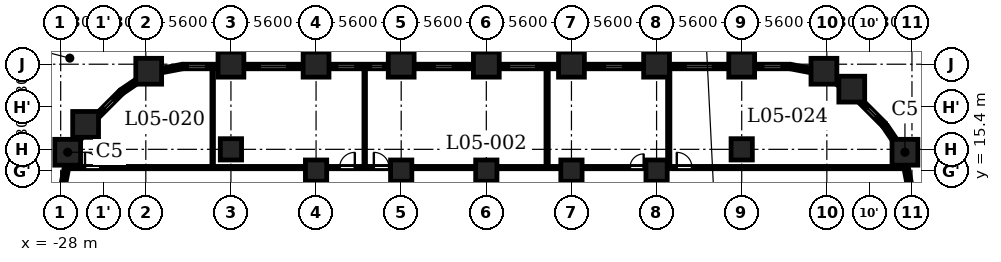
"""IFC4 building model, lengths in metres.
Left out: names, types, materials, properties, quantities, classifications, styles, units other than length and angle.
Written with IfcOpenShell. Run it as: python <this file> out.ifc"""

import sys

from ifc_helpers import new_model, si_unit, direction, frame, frame_2d, origin, origin_2d, place, context, subcontext, project, spatial, rectangle, extrude, element, fill, save


model = new_model("IFC4")
c1 = context("Model", 3, precision=1e-05, world=origin(), true_north=direction((0.0, 1.0)))
c2 = subcontext(c1, "Body", "Model", "MODEL_VIEW")
j1 = project(units=[si_unit("LENGTHUNIT", "METRE"), si_unit("PLANEANGLEUNIT", "RADIAN")], contexts=[c1])
p1 = place(None, origin())
s1 = spatial("IfcSite", under=j1, at=p1, CompositionType="ELEMENT")
p2 = place(p1, origin())
s2 = spatial("IfcBuilding", under=s1, at=p2, CompositionType="ELEMENT")
p3 = place(p2, frame((0.0, 0.0, 25.7)))
s3 = spatial("IfcBuildingStorey", under=s2, at=p3, CompositionType="ELEMENT", Elevation=25.7)
for number, where, z_axis, x_axis in (
    (1, (27.538, 16.609, 0.0), (0.0, 0.0, 1.0), (1.0, 0.0, 0.0)),
    (2, (24.04, 20.76, 0.0), (0.0, 0.0, 1.0), (1.0, 0.0, 0.0)),
    (3, (22.209, 21.938, 0.0), (0.0, 0.0, 1.0), (1.0, 0.0, 0.0)),
    (4, (16.8, 22.4, 0.0), (0.0, 0.0, 1.0), (1.0, 0.0, 0.0)),
    (5, (11.2, 22.4, 0.0), (0.0, 0.0, 1.0), (1.0, 0.0, 0.0)),
    (6, (5.6, 22.4, 0.0), (0.0, 0.0, 1.0), (1.0, 0.0, 0.0)),
    (7, (0.0, 22.4, 0.0), (0.0, 0.0, 1.0), (1.0, 0.0, 0.0)),
    (8, (-5.6, 22.4, 0.0), (0.0, 0.0, 1.0), (1.0, 0.0, 0.0)),
    (9, (-11.2, 22.4, 0.0), (0.0, 0.0, 1.0), (1.0, 0.0, 0.0)),
    (10, (-16.8, 22.4, 0.0), (0.0, 0.0, 1.0), (1.0, 0.0, 0.0)),
    (11, (-22.209, 21.938, 0.0), (0.0, 0.0, 1.0), (1.0, 0.0, 0.0)),
    (12, (-26.36, 18.44, 0.0), (0.0, 0.0, 1.0), (1.0, 0.0, 0.0)),
    (13, (-27.538, 16.609, 0.0), (0.0, 0.0, 1.0), (1.0, 0.0, 0.0)),
):
    element("IfcColumn", number, at=place(p3, frame(where, z_axis=z_axis, x_axis=x_axis)), inside=s3, PredefinedType="COLUMN", context=c2, shape_type="SweptSolid", body=[
        extrude(rectangle(XDim=1.7, YDim=1.7, at=origin_2d()), origin(), (0.0, 0.0, 1.0), 4.8),
    ])
for number, where, z_axis, x_axis in (
    (14, (-16.8, 16.8, 0.0), (0.0, 0.0, 1.0), (1.0, 0.0, 0.0)),
    (15, (16.8, 16.8, 0.0), (0.0, 0.0, 1.0), (1.0, 0.0, 0.0)),
    (16, (-11.2, 15.4, 0.0), (0.0, 0.0, 1.0), (1.0, 0.0, 0.0)),
    (17, (-5.6, 15.4, 0.0), (0.0, 0.0, 1.0), (1.0, 0.0, 0.0)),
    (18, (0.0, 15.4, 0.0), (0.0, 0.0, 1.0), (1.0, 0.0, 0.0)),
    (19, (5.6, 15.4, 0.0), (0.0, 0.0, 1.0), (1.0, 0.0, 0.0)),
    (20, (11.2, 15.4, 0.0), (0.0, 0.0, 1.0), (1.0, 0.0, 0.0)),
):
    element("IfcColumn", number, at=place(p3, frame(where, z_axis=z_axis, x_axis=x_axis)), inside=s3, PredefinedType="COLUMN", context=c2, shape_type="SweptSolid", body=[
        extrude(rectangle(XDim=1.4, YDim=1.4, at=origin_2d()), origin(), (0.0, 0.0, 1.0), 4.8),
    ])
for number, where, z_axis, x_axis in (
    (21, (27.853, 14.372, 0.0), (0.0, 0.0, 1.0), (-0.187, 0.982, 0.0)),
    (22, (26.969, 17.25, 0.0), (0.0, 0.0, 1.0), (-0.562, 0.827, 0.0)),
):
    element("IfcWall", number, at=place(p3, frame(where, z_axis=z_axis, x_axis=x_axis)), inside=s3, PredefinedType="SOLIDWALL", context=c2, shape_type="SweptSolid", body=[
        extrude(rectangle(XDim=1.406, YDim=0.3, at=frame_2d((0.703, 0.0))), origin(), (0.0, 0.0, 1.0), 3.55),
    ])
p4 = place(p3, frame((26.197, 18.391, 0.0), z_axis=(0.0, 0.0, 1.0), x_axis=(-0.707054835785, 0.707158722772, 0.0)))
e23 = element("IfcWall", 23, at=p4, inside=s3, PredefinedType="SOLIDWALL", context=c2, shape_type="SweptSolid", body=[
    extrude(rectangle(XDim=2.35, YDim=0.3, at=frame_2d((1.175, 0.0))), origin(), (0.0, 0.0, 1.0), 3.55),
])
p5 = place(p4, frame((0.775, 0.0, 0.6)))
e24 = element("IfcOpeningElement", 24, at=p5, cuts=e23, PredefinedType="OPENING", context=c2, shape_type="SweptSolid", body=[
    extrude(rectangle(XDim=0.8, YDim=1.55, at=frame_2d((0.4, 0.775))), frame((0.0, 0.16, 0.0), z_axis=(0.0, -1.0, 0.0), x_axis=(1.0, 0.0, 0.0)), (0.0, 0.0, 1.0), 0.32),
])
p6 = place(p3, frame((23.244, 21.101, 0.0), z_axis=(0.0, 0.0, 1.0), x_axis=(-0.827135885329, 0.562001981492, 0.0)))
e25 = element("IfcWall", 25, at=p6, inside=s3, PredefinedType="SOLIDWALL", context=c2, shape_type="SweptSolid", body=[
    extrude(rectangle(XDim=0.477, YDim=0.3, at=frame_2d((0.239, 0.0))), origin(), (0.0, 0.0, 1.0), 4.45),
])
p7 = place(p3, frame((21.353, 21.989, 0.0), z_axis=(0.0, 0.0, 1.0), x_axis=(-0.98229142023, 0.187359455971, 0.0)))
e26 = element("IfcWall", 26, at=p7, inside=s3, PredefinedType="SOLIDWALL", context=c2, shape_type="SweptSolid", body=[
    extrude(rectangle(XDim=1.406, YDim=0.3, at=frame_2d((0.703, 0.0))), origin(), (0.0, 0.0, 1.0), 3.55),
])
p8 = place(p3, frame((20.0, 22.25, 0.0), z_axis=(0.0, 0.0, 1.0), x_axis=(-1.0, 0.0, 0.0)))
e27 = element("IfcWall", 27, at=p8, inside=s3, PredefinedType="SOLIDWALL", context=c2, shape_type="SweptSolid", body=[
    extrude(rectangle(XDim=2.35, YDim=0.3, at=frame_2d((1.175, 0.0))), origin(), (0.0, 0.0, 1.0), 3.55),
])
p9 = place(p8, frame((0.575, 0.0, 0.6)))
e28 = element("IfcOpeningElement", 28, at=p9, cuts=e27, PredefinedType="OPENING", context=c2, shape_type="SweptSolid", body=[
    extrude(rectangle(XDim=1.2, YDim=1.55, at=frame_2d((0.6, 0.775))), frame((0.0, 0.16, 0.0), z_axis=(0.0, -1.0, 0.0), x_axis=(1.0, 0.0, 0.0)), (0.0, 0.0, 1.0), 0.32),
])
p10 = place(p3, frame((15.95, 22.25, 0.0), z_axis=(0.0, 0.0, 1.0), x_axis=(-1.0, 0.0, 0.0)))
e29 = element("IfcWall", 29, at=p10, inside=s3, PredefinedType="SOLIDWALL", context=c2, shape_type="SweptSolid", body=[
    extrude(rectangle(XDim=3.9, YDim=0.3, at=frame_2d((1.95, 0.0))), origin(), (0.0, 0.0, 1.0), 3.55),
])
p11 = place(p10, frame((1.038, 0.0, 0.9)))
e30 = element("IfcOpeningElement", 30, at=p11, cuts=e29, PredefinedType="OPENING", context=c2, shape_type="SweptSolid", body=[
    extrude(rectangle(XDim=1.8, YDim=1.25, at=frame_2d((0.9, 0.625))), frame((0.0, 0.16, 0.0), z_axis=(0.0, -1.0, 0.0), x_axis=(1.0, 0.0, 0.0)), (0.0, 0.0, 1.0), 0.32),
])
p12 = place(p3, frame((10.35, 22.25, 0.0), z_axis=(0.0, 0.0, 1.0), x_axis=(-1.0, 0.0, 0.0)))
e31 = element("IfcWall", 31, at=p12, inside=s3, PredefinedType="SOLIDWALL", context=c2, shape_type="SweptSolid", body=[
    extrude(rectangle(XDim=3.9, YDim=0.3, at=frame_2d((1.95, 0.0))), origin(), (0.0, 0.0, 1.0), 3.55),
])
p13 = place(p12, frame((1.35, 0.0, 0.6)))
e32 = element("IfcOpeningElement", 32, at=p13, cuts=e31, PredefinedType="OPENING", context=c2, shape_type="SweptSolid", body=[
    extrude(rectangle(XDim=1.2, YDim=1.55, at=frame_2d((0.6, 0.775))), frame((0.0, 0.16, 0.0), z_axis=(0.0, -1.0, 0.0), x_axis=(1.0, 0.0, 0.0)), (0.0, 0.0, 1.0), 0.32),
])
p14 = place(p3, frame((4.75, 22.25, 0.0), z_axis=(0.0, 0.0, 1.0), x_axis=(-1.0, 0.0, 0.0)))
e33 = element("IfcWall", 33, at=p14, inside=s3, PredefinedType="SOLIDWALL", context=c2, shape_type="SweptSolid", body=[
    extrude(rectangle(XDim=3.9, YDim=0.3, at=frame_2d((1.95, 0.0))), origin(), (0.0, 0.0, 1.0), 3.55),
])
p15 = place(p14, frame((1.462, 0.0, 0.9)))
e34 = element("IfcOpeningElement", 34, at=p15, cuts=e33, PredefinedType="OPENING", context=c2, shape_type="SweptSolid", body=[
    extrude(rectangle(XDim=1.8, YDim=1.25, at=frame_2d((0.9, 0.625))), frame((0.0, 0.16, 0.0), z_axis=(0.0, -1.0, 0.0), x_axis=(1.0, 0.0, 0.0)), (0.0, 0.0, 1.0), 0.32),
])
p16 = place(p3, frame((-0.85, 22.25, 0.0), z_axis=(0.0, 0.0, 1.0), x_axis=(-1.0, 0.0, 0.0)))
e35 = element("IfcWall", 35, at=p16, inside=s3, PredefinedType="SOLIDWALL", context=c2, shape_type="SweptSolid", body=[
    extrude(rectangle(XDim=3.9, YDim=0.3, at=frame_2d((1.95, 0.0))), origin(), (0.0, 0.0, 1.0), 3.55),
])
p17 = place(p16, frame((1.35, 0.0, 0.6)))
e36 = element("IfcOpeningElement", 36, at=p17, cuts=e35, PredefinedType="OPENING", context=c2, shape_type="SweptSolid", body=[
    extrude(rectangle(XDim=1.2, YDim=1.55, at=frame_2d((0.6, 0.775))), frame((0.0, 0.16, 0.0), z_axis=(0.0, -1.0, 0.0), x_axis=(1.0, 0.0, 0.0)), (0.0, 0.0, 1.0), 0.32),
])
p18 = place(p3, frame((-6.45, 22.25, 0.0), z_axis=(0.0, 0.0, 1.0), x_axis=(-1.0, 0.0, 0.0)))
e37 = element("IfcWall", 37, at=p18, inside=s3, PredefinedType="SOLIDWALL", context=c2, shape_type="SweptSolid", body=[
    extrude(rectangle(XDim=3.9, YDim=0.3, at=frame_2d((1.95, 0.0))), origin(), (0.0, 0.0, 1.0), 3.55),
])
p19 = place(p18, frame((0.337, 0.0, 0.6)))
e38 = element("IfcOpeningElement", 38, at=p19, cuts=e37, PredefinedType="OPENING", context=c2, shape_type="SweptSolid", body=[
    extrude(rectangle(XDim=0.8, YDim=1.55, at=frame_2d((0.4, 0.775))), frame((0.0, 0.16, 0.0), z_axis=(0.0, -1.0, 0.0), x_axis=(1.0, 0.0, 0.0)), (0.0, 0.0, 1.0), 0.32),
])
p20 = place(p18, frame((2.163, 0.0, 0.6)))
e39 = element("IfcOpeningElement", 39, at=p20, cuts=e37, PredefinedType="OPENING", context=c2, shape_type="SweptSolid", body=[
    extrude(rectangle(XDim=1.2, YDim=1.55, at=frame_2d((0.6, 0.775))), frame((0.0, 0.16, 0.0), z_axis=(0.0, -1.0, 0.0), x_axis=(1.0, 0.0, 0.0)), (0.0, 0.0, 1.0), 0.32),
])
p21 = place(p3, frame((-12.05, 22.25, 0.0), z_axis=(0.0, 0.0, 1.0), x_axis=(-1.0, 0.0, 0.0)))
e40 = element("IfcWall", 40, at=p21, inside=s3, PredefinedType="SOLIDWALL", context=c2, shape_type="SweptSolid", body=[
    extrude(rectangle(XDim=3.9, YDim=0.3, at=frame_2d((1.95, 0.0))), origin(), (0.0, 0.0, 1.0), 3.55),
])
p22 = place(p21, frame((1.05, 0.0, 0.9)))
e41 = element("IfcOpeningElement", 41, at=p22, cuts=e40, PredefinedType="OPENING", context=c2, shape_type="SweptSolid", body=[
    extrude(rectangle(XDim=1.8, YDim=1.25, at=frame_2d((0.9, 0.625))), frame((0.0, 0.16, 0.0), z_axis=(0.0, -1.0, 0.0), x_axis=(1.0, 0.0, 0.0)), (0.0, 0.0, 1.0), 0.32),
])
p23 = place(p3, frame((-17.65, 22.25, 0.0), z_axis=(0.0, 0.0, 1.0), x_axis=(-1.0, 0.0, 0.0)))
e42 = element("IfcWall", 42, at=p23, inside=s3, PredefinedType="SOLIDWALL", context=c2, shape_type="SweptSolid", body=[
    extrude(rectangle(XDim=2.35, YDim=0.3, at=frame_2d((1.175, 0.0))), origin(), (0.0, 0.0, 1.0), 3.55),
])
p24 = place(p23, frame((0.788, 0.0, 0.6)))
e43 = element("IfcOpeningElement", 43, at=p24, cuts=e42, PredefinedType="OPENING", context=c2, shape_type="SweptSolid", body=[
    extrude(rectangle(XDim=1.2, YDim=1.55, at=frame_2d((0.6, 0.775))), frame((0.0, 0.16, 0.0), z_axis=(0.0, -1.0, 0.0), x_axis=(1.0, 0.0, 0.0)), (0.0, 0.0, 1.0), 0.32),
])
for number, where, z_axis, x_axis in (
    (44, (-19.972, 22.253, 0.0), (0.0, 0.0, 1.0), (-0.982, -0.187, 0.0)),
    (45, (-22.85, 21.369, 0.0), (0.0, 0.0, 1.0), (-0.827, -0.562, 0.0)),
):
    element("IfcWall", number, at=place(p3, frame(where, z_axis=z_axis, x_axis=x_axis)), inside=s3, PredefinedType="SOLIDWALL", context=c2, shape_type="SweptSolid", body=[
        extrude(rectangle(XDim=1.406, YDim=0.3, at=frame_2d((0.703, 0.0))), origin(), (0.0, 0.0, 1.0), 3.55),
    ])
p25 = place(p3, frame((-23.991, 20.597, 0.0), z_axis=(0.0, 0.0, 1.0), x_axis=(-0.707054835785, -0.707158722772, 0.0)))
e46 = element("IfcWall", 46, at=p25, inside=s3, PredefinedType="SOLIDWALL", context=c2, shape_type="SweptSolid", body=[
    extrude(rectangle(XDim=2.35, YDim=0.3, at=frame_2d((1.175, 0.0))), origin(), (0.0, 0.0, 1.0), 3.55),
])
p26 = place(p25, frame((0.775, 0.0, 0.6)))
e47 = element("IfcOpeningElement", 47, at=p26, cuts=e46, PredefinedType="OPENING", context=c2, shape_type="SweptSolid", body=[
    extrude(rectangle(XDim=0.8, YDim=1.55, at=frame_2d((0.4, 0.775))), frame((0.0, 0.16, 0.0), z_axis=(0.0, -1.0, 0.0), x_axis=(1.0, 0.0, 0.0)), (0.0, 0.0, 1.0), 0.32),
])
p27 = place(p3, frame((-26.701, 17.644, 0.0), z_axis=(0.0, 0.0, 1.0), x_axis=(-0.562001981492, -0.827135885329, 0.0)))
e48 = element("IfcWall", 48, at=p27, inside=s3, PredefinedType="SOLIDWALL", context=c2, shape_type="SweptSolid", body=[
    extrude(rectangle(XDim=0.477, YDim=0.3, at=frame_2d((0.239, 0.0))), origin(), (0.0, 0.0, 1.0), 4.45),
])
p28 = place(p3, frame((-27.589, 15.753, 0.0), z_axis=(0.0, 0.0, 1.0), x_axis=(-0.187327504018, -0.982297514116, 0.0)))
e49 = element("IfcWall", 49, at=p28, inside=s3, PredefinedType="SOLIDWALL", context=c2, shape_type="SweptSolid", body=[
    extrude(rectangle(XDim=1.406, YDim=0.3, at=frame_2d((0.703, 0.0))), origin(), (0.0, 0.0, 1.0), 3.55),
])
p29 = place(p3, frame((-27.446, 15.6, 0.0), z_axis=(0.0, 0.0, 1.0), x_axis=(1.0, 0.0, 0.0)))
e50 = element("IfcWall", 50, at=p29, inside=s3, PredefinedType="PARTITIONING", context=c2, shape_type="SweptSolid", body=[
    extrude(rectangle(XDim=54.892, YDim=0.15, at=frame_2d((27.446, 0.0))), origin(), (0.0, 0.0, 1.0), 4.45),
])
p30 = place(p29, frame((1.046, 0.0, 0.0)))
e51 = element("IfcOpeningElement", 51, at=p30, cuts=e50, PredefinedType="OPENING", context=c2, shape_type="SweptSolid", body=[
    extrude(rectangle(XDim=1.0, YDim=2.1, at=frame_2d((0.5, 1.05))), frame((0.0, 0.085, 0.0), z_axis=(0.0, -1.0, 0.0), x_axis=(1.0, 0.0, 0.0)), (0.0, 0.0, 1.0), 0.17),
])
p31 = place(p29, frame((17.796, 0.0, 0.0)))
e52 = element("IfcOpeningElement", 52, at=p31, cuts=e50, PredefinedType="OPENING", context=c2, shape_type="SweptSolid", body=[
    extrude(rectangle(XDim=1.0, YDim=2.1, at=frame_2d((0.5, 1.05))), frame((0.0, 0.085, 0.0), z_axis=(0.0, -1.0, 0.0), x_axis=(1.0, 0.0, 0.0)), (0.0, 0.0, 1.0), 0.17),
])
p32 = place(p29, frame((20.046, 0.0, 0.0)))
e53 = element("IfcOpeningElement", 53, at=p32, cuts=e50, PredefinedType="OPENING", context=c2, shape_type="SweptSolid", body=[
    extrude(rectangle(XDim=1.0, YDim=2.1, at=frame_2d((0.5, 1.05))), frame((0.0, 0.085, 0.0), z_axis=(0.0, -1.0, 0.0), x_axis=(1.0, 0.0, 0.0)), (0.0, 0.0, 1.0), 0.17),
])
p33 = place(p29, frame((36.896, 0.0, 0.0)))
e54 = element("IfcOpeningElement", 54, at=p33, cuts=e50, PredefinedType="OPENING", context=c2, shape_type="SweptSolid", body=[
    extrude(rectangle(XDim=0.9, YDim=2.1, at=frame_2d((0.45, 1.05))), frame((0.0, 0.085, 0.0), z_axis=(0.0, -1.0, 0.0), x_axis=(1.0, 0.0, 0.0)), (0.0, 0.0, 1.0), 0.17),
])
p34 = place(p29, frame((39.975, 0.0, 0.0)))
e55 = element("IfcOpeningElement", 55, at=p34, cuts=e50, PredefinedType="OPENING", context=c2, shape_type="SweptSolid", body=[
    extrude(rectangle(XDim=1.0, YDim=2.1, at=frame_2d((0.5, 1.05))), frame((0.0, 0.085, 0.0), z_axis=(0.0, -1.0, 0.0), x_axis=(1.0, 0.0, 0.0)), (0.0, 0.0, 1.0), 0.17),
])
for number, where, z_axis, x_axis in (
    (56, (-18.0, 15.675, 0.0), (0.0, 0.0, 1.0), (0.0, 1.0, 0.0)),
    (57, (-8.0, 15.675, 0.0), (0.0, 0.0, 1.0), (0.0, 1.0, 0.0)),
):
    element("IfcWall", number, at=place(p3, frame(where, z_axis=z_axis, x_axis=x_axis)), inside=s3, PredefinedType="PARTITIONING", context=c2, shape_type="SweptSolid", body=[
        extrude(rectangle(XDim=6.405, YDim=0.1, at=frame_2d((3.203, 0.0))), origin(), (0.0, 0.0, 1.0), 4.45),
    ])
p35 = place(p3, frame((4.0, 15.675, 0.0), z_axis=(0.0, 0.0, 1.0), x_axis=(0.0, 1.0, 0.0)))
e58 = element("IfcWall", 58, at=p35, inside=s3, PredefinedType="PARTITIONING", context=c2, shape_type="SweptSolid", body=[
    extrude(rectangle(XDim=6.405, YDim=0.15, at=frame_2d((3.203, 0.0))), origin(), (0.0, 0.0, 1.0), 4.45),
])
p36 = place(p3, frame((12.0, 15.675, 0.0), z_axis=(0.0, 0.0, 1.0), x_axis=(0.0, 1.0, 0.0)))
e59 = element("IfcWall", 59, at=p36, inside=s3, PredefinedType="PARTITIONING", context=c2, shape_type="SweptSolid", body=[
    extrude(rectangle(XDim=6.635, YDim=0.15, at=frame_2d((3.317, 0.0))), origin(), (0.0, 0.0, 1.0), 4.45),
])
p37 = place(p30, origin())
e60 = element("IfcDoor", 60, at=p37, inside=s3, OperationType="SINGLE_SWING_RIGHT", PredefinedType="DOOR", context=c2, shape_type="SweptSolid", body=[
    extrude(rectangle(XDim=1.0, YDim=2.1, at=frame_2d((0.5, 1.05))), frame((0.0, 0.025, 0.0), z_axis=(0.0, -1.0, 0.0), x_axis=(1.0, 0.0, 0.0)), (0.0, 0.0, 1.0), 0.05),
])
fill(e51, e60)
p38 = place(p31, origin())
e61 = element("IfcDoor", 61, at=p38, inside=s3, OperationType="SINGLE_SWING_LEFT", PredefinedType="DOOR", context=c2, shape_type="SweptSolid", body=[
    extrude(rectangle(XDim=1.0, YDim=2.1, at=frame_2d((0.5, 1.05))), frame((0.0, 0.025, 0.0), z_axis=(0.0, -1.0, 0.0), x_axis=(1.0, 0.0, 0.0)), (0.0, 0.0, 1.0), 0.05),
])
fill(e52, e61)
p39 = place(p32, origin())
e62 = element("IfcDoor", 62, at=p39, inside=s3, OperationType="SINGLE_SWING_RIGHT", PredefinedType="DOOR", context=c2, shape_type="SweptSolid", body=[
    extrude(rectangle(XDim=1.0, YDim=2.1, at=frame_2d((0.5, 1.05))), frame((0.0, 0.025, 0.0), z_axis=(0.0, -1.0, 0.0), x_axis=(1.0, 0.0, 0.0)), (0.0, 0.0, 1.0), 0.05),
])
fill(e53, e62)
p40 = place(p33, origin())
e63 = element("IfcDoor", 63, at=p40, inside=s3, OperationType="SINGLE_SWING_LEFT", PredefinedType="DOOR", context=c2, shape_type="SweptSolid", body=[
    extrude(rectangle(XDim=0.9, YDim=2.1, at=frame_2d((0.45, 1.05))), frame((0.0, 0.025, 0.0), z_axis=(0.0, -1.0, 0.0), x_axis=(1.0, 0.0, 0.0)), (0.0, 0.0, 1.0), 0.05),
])
fill(e54, e63)
p41 = place(p34, origin())
e64 = element("IfcDoor", 64, at=p41, inside=s3, OperationType="SINGLE_SWING_RIGHT", PredefinedType="DOOR", context=c2, shape_type="SweptSolid", body=[
    extrude(rectangle(XDim=1.0, YDim=2.1, at=frame_2d((0.5, 1.05))), frame((0.0, 0.025, 0.0), z_axis=(0.0, -1.0, 0.0), x_axis=(1.0, 0.0, 0.0)), (0.0, 0.0, 1.0), 0.05),
])
fill(e55, e64)
p42 = place(p5, origin())
e65 = element("IfcWindow", 65, at=p42, inside=s3, PartitioningType="SINGLE_PANEL", PredefinedType="WINDOW", context=c2, shape_type="SweptSolid", body=[
    extrude(rectangle(XDim=0.8, YDim=1.55, at=frame_2d((0.4, 0.775))), frame((0.0, 0.03, 0.0), z_axis=(0.0, -1.0, 0.0), x_axis=(1.0, 0.0, 0.0)), (0.0, 0.0, 1.0), 0.06),
])
fill(e24, e65)
p43 = place(p9, origin())
e66 = element("IfcWindow", 66, at=p43, inside=s3, PartitioningType="SINGLE_PANEL", PredefinedType="WINDOW", context=c2, shape_type="SweptSolid", body=[
    extrude(rectangle(XDim=1.2, YDim=1.55, at=frame_2d((0.6, 0.775))), frame((0.0, 0.03, 0.0), z_axis=(0.0, -1.0, 0.0), x_axis=(1.0, 0.0, 0.0)), (0.0, 0.0, 1.0), 0.06),
])
fill(e28, e66)
p44 = place(p11, origin())
e67 = element("IfcWindow", 67, at=p44, inside=s3, PartitioningType="SINGLE_PANEL", PredefinedType="WINDOW", context=c2, shape_type="SweptSolid", body=[
    extrude(rectangle(XDim=1.8, YDim=1.25, at=frame_2d((0.9, 0.625))), frame((0.0, 0.03, 0.0), z_axis=(0.0, -1.0, 0.0), x_axis=(1.0, 0.0, 0.0)), (0.0, 0.0, 1.0), 0.06),
])
fill(e30, e67)
p45 = place(p13, origin())
e68 = element("IfcWindow", 68, at=p45, inside=s3, PartitioningType="SINGLE_PANEL", PredefinedType="WINDOW", context=c2, shape_type="SweptSolid", body=[
    extrude(rectangle(XDim=1.2, YDim=1.55, at=frame_2d((0.6, 0.775))), frame((0.0, 0.03, 0.0), z_axis=(0.0, -1.0, 0.0), x_axis=(1.0, 0.0, 0.0)), (0.0, 0.0, 1.0), 0.06),
])
fill(e32, e68)
p46 = place(p15, origin())
e69 = element("IfcWindow", 69, at=p46, inside=s3, PartitioningType="SINGLE_PANEL", PredefinedType="WINDOW", context=c2, shape_type="SweptSolid", body=[
    extrude(rectangle(XDim=1.8, YDim=1.25, at=frame_2d((0.9, 0.625))), frame((0.0, 0.03, 0.0), z_axis=(0.0, -1.0, 0.0), x_axis=(1.0, 0.0, 0.0)), (0.0, 0.0, 1.0), 0.06),
])
fill(e34, e69)
p47 = place(p17, origin())
e70 = element("IfcWindow", 70, at=p47, inside=s3, PartitioningType="SINGLE_PANEL", PredefinedType="WINDOW", context=c2, shape_type="SweptSolid", body=[
    extrude(rectangle(XDim=1.2, YDim=1.55, at=frame_2d((0.6, 0.775))), frame((0.0, 0.03, 0.0), z_axis=(0.0, -1.0, 0.0), x_axis=(1.0, 0.0, 0.0)), (0.0, 0.0, 1.0), 0.06),
])
fill(e36, e70)
p48 = place(p19, origin())
e71 = element("IfcWindow", 71, at=p48, inside=s3, PartitioningType="SINGLE_PANEL", PredefinedType="WINDOW", context=c2, shape_type="SweptSolid", body=[
    extrude(rectangle(XDim=0.8, YDim=1.55, at=frame_2d((0.4, 0.775))), frame((0.0, 0.03, 0.0), z_axis=(0.0, -1.0, 0.0), x_axis=(1.0, 0.0, 0.0)), (0.0, 0.0, 1.0), 0.06),
])
fill(e38, e71)
p49 = place(p20, origin())
e72 = element("IfcWindow", 72, at=p49, inside=s3, PartitioningType="SINGLE_PANEL", PredefinedType="WINDOW", context=c2, shape_type="SweptSolid", body=[
    extrude(rectangle(XDim=1.2, YDim=1.55, at=frame_2d((0.6, 0.775))), frame((0.0, 0.03, 0.0), z_axis=(0.0, -1.0, 0.0), x_axis=(1.0, 0.0, 0.0)), (0.0, 0.0, 1.0), 0.06),
])
fill(e39, e72)
p50 = place(p22, origin())
e73 = element("IfcWindow", 73, at=p50, inside=s3, PartitioningType="SINGLE_PANEL", PredefinedType="WINDOW", context=c2, shape_type="SweptSolid", body=[
    extrude(rectangle(XDim=1.8, YDim=1.25, at=frame_2d((0.9, 0.625))), frame((0.0, 0.03, 0.0), z_axis=(0.0, -1.0, 0.0), x_axis=(1.0, 0.0, 0.0)), (0.0, 0.0, 1.0), 0.06),
])
fill(e41, e73)
p51 = place(p24, origin())
e74 = element("IfcWindow", 74, at=p51, inside=s3, PartitioningType="SINGLE_PANEL", PredefinedType="WINDOW", context=c2, shape_type="SweptSolid", body=[
    extrude(rectangle(XDim=1.2, YDim=1.55, at=frame_2d((0.6, 0.775))), frame((0.0, 0.03, 0.0), z_axis=(0.0, -1.0, 0.0), x_axis=(1.0, 0.0, 0.0)), (0.0, 0.0, 1.0), 0.06),
])
fill(e43, e74)
p52 = place(p26, origin())
e75 = element("IfcWindow", 75, at=p52, inside=s3, PartitioningType="SINGLE_PANEL", PredefinedType="WINDOW", context=c2, shape_type="SweptSolid", body=[
    extrude(rectangle(XDim=0.8, YDim=1.55, at=frame_2d((0.4, 0.775))), frame((0.0, 0.03, 0.0), z_axis=(0.0, -1.0, 0.0), x_axis=(1.0, 0.0, 0.0)), (0.0, 0.0, 1.0), 0.06),
])
fill(e47, e75)
save(model, sys.argv[1])
